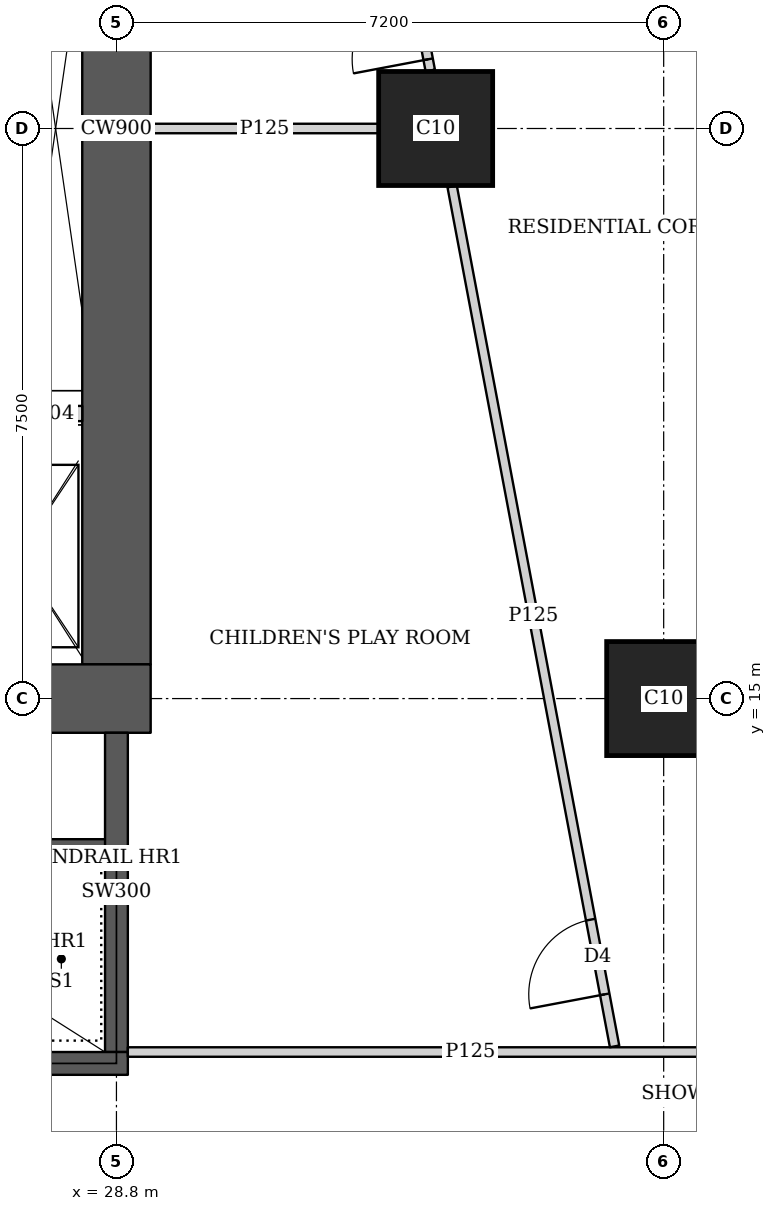
"""IFC4 building model, lengths in metres.
Left out: names, types, materials, properties, quantities, classifications, styles, units other than length and angle.
Written with IfcOpenShell. Run it as: python <this file> out.ifc"""

import sys

from ifc_helpers import new_model, si_unit, direction, frame, frame_2d, origin, origin_2d, place, context, subcontext, project, spatial, rectangle, extrude, element, fill, save


model = new_model("IFC4")
c1 = context("Model", 3, precision=1e-05, world=origin(), true_north=direction((0.0, 1.0)))
c2 = subcontext(c1, "Body", "Model", "MODEL_VIEW")
j1 = project(units=[si_unit("LENGTHUNIT", "METRE"), si_unit("PLANEANGLEUNIT", "RADIAN")], contexts=[c1])
p1 = place(None, origin())
s1 = spatial("IfcSite", under=j1, at=p1, CompositionType="ELEMENT")
p2 = place(p1, origin())
s2 = spatial("IfcBuilding", under=s1, at=p2, CompositionType="ELEMENT")
p3 = place(p2, frame((0.0, 0.0, 180.8)))
s3 = spatial("IfcBuildingStorey", under=s2, at=p3, CompositionType="ELEMENT", Elevation=180.8)
for number, where, z_axis, x_axis in (
    (1, (36.0, 15.0, 0.0), (0.0, 0.0, 1.0), (1.0, 0.0, 0.0)),
    (2, (33.0, 22.5, 0.0), (0.0, 0.0, 1.0), (1.0, 0.0, 0.0)),
):
    element("IfcColumn", number, at=place(p3, frame(where, z_axis=z_axis, x_axis=x_axis)), inside=s3, PredefinedType="COLUMN", context=c2, shape_type="SweptSolid", body=[
        extrude(rectangle(XDim=1.5, YDim=1.5, at=origin_2d()), origin(), (0.0, 0.0, 1.0), 3.75),
    ])
p4 = place(p3, frame((13.95, 15.0, 0.0), z_axis=(0.0, 0.0, 1.0), x_axis=(1.0, 0.0, 0.0)))
e3 = element("IfcWall", 3, at=p4, inside=s3, PredefinedType="SHEAR", context=c2, shape_type="SweptSolid", body=[
    extrude(rectangle(XDim=15.3, YDim=0.9, at=frame_2d((7.65, 0.0))), origin(), (0.0, 0.0, 1.0), 3.75),
])
p5 = place(p4, frame((4.45, 0.0, 0.0)))
e4 = element("IfcOpeningElement", 4, at=p5, cuts=e3, PredefinedType="OPENING", context=c2, shape_type="SweptSolid", body=[
    extrude(rectangle(XDim=1.8, YDim=2.1, at=frame_2d((0.9, 1.05))), frame((0.0, 0.46, 0.0), z_axis=(0.0, -1.0, 0.0), x_axis=(1.0, 0.0, 0.0)), (0.0, 0.0, 1.0), 0.92),
])
p6 = place(p4, frame((10.7, 0.0, 0.0)))
e5 = element("IfcOpeningElement", 5, at=p6, cuts=e3, PredefinedType="OPENING", context=c2, shape_type="SweptSolid", body=[
    extrude(rectangle(XDim=1.1, YDim=2.1, at=frame_2d((0.55, 1.05))), frame((0.0, 0.46, 0.0), z_axis=(0.0, -1.0, 0.0), x_axis=(1.0, 0.0, 0.0)), (0.0, 0.0, 1.0), 0.92),
])
p7 = place(p3, frame((28.8, 15.45, 0.0), z_axis=(0.0, 0.0, 1.0), x_axis=(0.0, 1.0, 0.0)))
e6 = element("IfcWall", 6, at=p7, inside=s3, PredefinedType="SHEAR", context=c2, shape_type="SweptSolid", body=[
    extrude(rectangle(XDim=14.1, YDim=0.9, at=frame_2d((7.05, 0.0))), origin(), (0.0, 0.0, 1.0), 3.75),
])
p8 = place(p3, frame((21.45, 10.2, 0.0), z_axis=(0.0, 0.0, 1.0), x_axis=(1.0, 0.0, 0.0)))
e7 = element("IfcWall", 7, at=p8, inside=s3, PredefinedType="SHEAR", context=c2, shape_type="SweptSolid", body=[
    extrude(rectangle(XDim=7.5, YDim=0.3, at=frame_2d((3.75, 0.0))), origin(), (0.0, 0.0, 1.0), 3.75),
])
p9 = place(p8, frame((0.5, 0.0, 0.0)))
e8 = element("IfcOpeningElement", 8, at=p9, cuts=e7, PredefinedType="OPENING", context=c2, shape_type="SweptSolid", body=[
    extrude(rectangle(XDim=1.1, YDim=2.1, at=frame_2d((0.55, 1.05))), frame((0.0, 0.16, 0.0), z_axis=(0.0, -1.0, 0.0), x_axis=(1.0, 0.0, 0.0)), (0.0, 0.0, 1.0), 0.32),
])
p10 = place(p3, frame((28.8, 10.35, 0.0), z_axis=(0.0, 0.0, 1.0), x_axis=(0.0, 1.0, 0.0)))
e9 = element("IfcWall", 9, at=p10, inside=s3, PredefinedType="SHEAR", context=c2, shape_type="SweptSolid", body=[
    extrude(rectangle(XDim=4.2, YDim=0.3, at=frame_2d((2.1, 0.0))), origin(), (0.0, 0.0, 1.0), 3.75),
])
p11 = place(p3, frame((33.623, 43.022, 0.0), z_axis=(0.0, 0.0, 1.0), x_axis=(0.185596841028, -0.98262597798, 0.0)))
e10 = element("IfcWall", 10, at=p11, inside=s3, PredefinedType="SOLIDWALL", context=c2, shape_type="SweptSolid", body=[
    extrude(rectangle(XDim=41.66, YDim=0.15, at=frame_2d((20.83, 0.0))), origin(), (0.0, 0.0, 1.0), 2.5),
])
p12 = place(p11, frame((8.034, 0.0, 0.0)))
e11 = element("IfcOpeningElement", 11, at=p12, cuts=e10, PredefinedType="OPENING", context=c2, shape_type="SweptSolid", body=[
    extrude(rectangle(XDim=1.0, YDim=2.1, at=frame_2d((0.5, 1.05))), frame((0.0, 0.085, 0.0), z_axis=(0.0, -1.0, 0.0), x_axis=(1.0, 0.0, 0.0)), (0.0, 0.0, 1.0), 0.17),
])
p13 = place(p11, frame((12.611, 0.0, 0.0)))
e12 = element("IfcOpeningElement", 12, at=p13, cuts=e10, PredefinedType="OPENING", context=c2, shape_type="SweptSolid", body=[
    extrude(rectangle(XDim=1.0, YDim=2.1, at=frame_2d((0.5, 1.05))), frame((0.0, 0.085, 0.0), z_axis=(0.0, -1.0, 0.0), x_axis=(1.0, 0.0, 0.0)), (0.0, 0.0, 1.0), 0.17),
])
p14 = place(p11, frame((20.242, 0.0, 0.0)))
e13 = element("IfcOpeningElement", 13, at=p14, cuts=e10, PredefinedType="OPENING", context=c2, shape_type="SweptSolid", body=[
    extrude(rectangle(XDim=1.0, YDim=2.1, at=frame_2d((0.5, 1.05))), frame((0.0, 0.085, 0.0), z_axis=(0.0, -1.0, 0.0), x_axis=(1.0, 0.0, 0.0)), (0.0, 0.0, 1.0), 0.17),
])
p15 = place(p11, frame((31.206, 0.0, 0.0)))
e14 = element("IfcOpeningElement", 14, at=p15, cuts=e10, PredefinedType="OPENING", context=c2, shape_type="SweptSolid", body=[
    extrude(rectangle(XDim=1.0, YDim=2.1, at=frame_2d((0.5, 1.05))), frame((0.0, 0.085, 0.0), z_axis=(0.0, -1.0, 0.0), x_axis=(1.0, 0.0, 0.0)), (0.0, 0.0, 1.0), 0.17),
])
p16 = place(p3, frame((28.95, 10.35, 0.0), z_axis=(0.0, 0.0, 1.0), x_axis=(1.0, 0.0, 0.0)))
e15 = element("IfcWall", 15, at=p16, inside=s3, PredefinedType="PARTITIONING", context=c2, shape_type="SweptSolid", body=[
    extrude(rectangle(XDim=9.013, YDim=0.125, at=frame_2d((4.506, 0.0))), origin(), (0.0, 0.0, 1.0), 3.5),
])
p17 = place(p3, frame((35.354, 10.424, 0.0), z_axis=(0.0, 0.0, 1.0), x_axis=(-0.185612234763, 0.982623070311, 0.0)))
e16 = element("IfcWall", 16, at=p17, inside=s3, PredefinedType="PARTITIONING", context=c2, shape_type="SweptSolid", body=[
    extrude(rectangle(XDim=11.513, YDim=0.125, at=frame_2d((5.756, 0.0))), origin(), (0.0, 0.0, 1.0), 3.5),
])
p18 = place(p17, frame((0.697, 0.0, 0.0)))
e17 = element("IfcOpeningElement", 17, at=p18, cuts=e16, PredefinedType="OPENING", context=c2, shape_type="SweptSolid", body=[
    extrude(rectangle(XDim=1.0, YDim=2.1, at=frame_2d((0.5, 1.05))), frame((0.0, 0.073, 0.0), z_axis=(0.0, -1.0, 0.0), x_axis=(1.0, 0.0, 0.0)), (0.0, 0.0, 1.0), 0.145),
])
p19 = place(p3, frame((32.929, 23.263, 0.0), z_axis=(0.0, 0.0, 1.0), x_axis=(-0.185612234763, 0.982623070311, 0.0)))
e18 = element("IfcWall", 18, at=p19, inside=s3, PredefinedType="PARTITIONING", context=c2, shape_type="SweptSolid", body=[
    extrude(rectangle(XDim=11.513, YDim=0.125, at=frame_2d((5.756, 0.0))), origin(), (0.0, 0.0, 1.0), 3.5),
])
p20 = place(p19, frame((0.15, 0.0, 0.0)))
e19 = element("IfcOpeningElement", 19, at=p20, cuts=e18, PredefinedType="OPENING", context=c2, shape_type="SweptSolid", body=[
    extrude(rectangle(XDim=1.0, YDim=2.1, at=frame_2d((0.5, 1.05))), frame((0.0, 0.073, 0.0), z_axis=(0.0, -1.0, 0.0), x_axis=(1.0, 0.0, 0.0)), (0.0, 0.0, 1.0), 0.145),
])
p21 = place(p19, frame((7.679, 0.0, 0.0)))
e20 = element("IfcOpeningElement", 20, at=p21, cuts=e18, PredefinedType="OPENING", context=c2, shape_type="SweptSolid", body=[
    extrude(rectangle(XDim=1.0, YDim=2.1, at=frame_2d((0.5, 1.05))), frame((0.0, 0.073, 0.0), z_axis=(0.0, -1.0, 0.0), x_axis=(1.0, 0.0, 0.0)), (0.0, 0.0, 1.0), 0.145),
])
p22 = place(p19, frame((10.122, 0.0, 0.0)))
e21 = element("IfcOpeningElement", 21, at=p22, cuts=e18, PredefinedType="OPENING", context=c2, shape_type="SweptSolid", body=[
    extrude(rectangle(XDim=1.0, YDim=2.1, at=frame_2d((0.5, 1.05))), frame((0.0, 0.073, 0.0), z_axis=(0.0, -1.0, 0.0), x_axis=(1.0, 0.0, 0.0)), (0.0, 0.0, 1.0), 0.145),
])
p23 = place(p3, frame((29.25, 22.5, 0.0), z_axis=(0.0, 0.0, 1.0), x_axis=(1.0, 0.0, 0.0)))
e22 = element("IfcWall", 22, at=p23, inside=s3, PredefinedType="PARTITIONING", context=c2, shape_type="SweptSolid", body=[
    extrude(rectangle(XDim=2.999, YDim=0.125, at=frame_2d((1.5, 0.0))), origin(), (0.0, 0.0, 1.0), 3.5),
])
p24 = place(p3, frame((23.0, 13.05, 0.0), z_axis=(0.0, 0.0, 1.0), x_axis=(1.0, 0.0, 0.0)))
e23 = element("IfcWall", 23, at=p24, inside=s3, PredefinedType="SHEAR", context=c2, shape_type="SweptSolid", body=[
    extrude(rectangle(XDim=5.8, YDim=0.2, at=frame_2d((2.9, 0.0))), origin(), (0.0, 0.0, 1.0), 3.75),
])
p25 = place(p3, frame((27.4, 18.75, 0.0), z_axis=(0.0, 0.0, 1.0), x_axis=(1.0, 0.0, 0.0)))
e24 = element("IfcWall", 24, at=p25, inside=s3, PredefinedType="SOLIDWALL", context=c2, shape_type="SweptSolid", body=[
    extrude(rectangle(XDim=0.95, YDim=0.2, at=frame_2d((0.475, 0.0))), origin(), (0.0, 0.0, 1.0), 3.5),
])
p26 = place(p18, origin())
e25 = element("IfcDoor", 25, at=p26, inside=s3, OperationType="SINGLE_SWING_LEFT", PredefinedType="DOOR", context=c2, shape_type="SweptSolid", body=[
    extrude(rectangle(XDim=1.0, YDim=2.1, at=frame_2d((0.5, 1.05))), frame((0.0, 0.025, 0.0), z_axis=(0.0, -1.0, 0.0), x_axis=(1.0, 0.0, 0.0)), (0.0, 0.0, 1.0), 0.05),
])
fill(e17, e25)
p27 = place(p20, origin())
e26 = element("IfcDoor", 26, at=p27, inside=s3, OperationType="SINGLE_SWING_LEFT", PredefinedType="DOOR", context=c2, shape_type="SweptSolid", body=[
    extrude(rectangle(XDim=1.0, YDim=2.1, at=frame_2d((0.5, 1.05))), frame((0.0, 0.025, 0.0), z_axis=(0.0, -1.0, 0.0), x_axis=(1.0, 0.0, 0.0)), (0.0, 0.0, 1.0), 0.05),
])
fill(e19, e26)
save(model, sys.argv[1])
